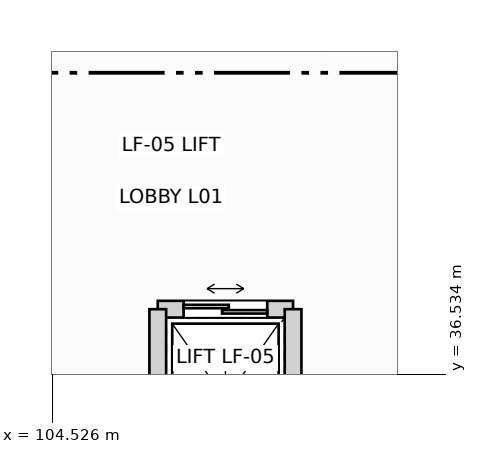
"""IFC4 building model, lengths in metres.
Left out: names, types, materials, properties, quantities, classifications, styles, units other than length and angle.
Written with IfcOpenShell. Run it as: python <this file> out.ifc"""

import sys

from ifc_helpers import new_model, si_unit, direction, frame, frame_2d, origin, place, context, subcontext, project, spatial, rectangle, extrude, element, fill, save


model = new_model("IFC4")
c1 = context("Model", 3, precision=1e-05, world=origin(), true_north=direction((0.0, 1.0)))
c2 = subcontext(c1, "Body", "Model", "MODEL_VIEW")
j1 = project(units=[si_unit("LENGTHUNIT", "METRE"), si_unit("PLANEANGLEUNIT", "RADIAN")], contexts=[c1])
p1 = place(None, origin())
s1 = spatial("IfcSite", under=j1, at=p1, CompositionType="ELEMENT")
p2 = place(p1, origin())
s2 = spatial("IfcBuilding", under=s1, at=p2, CompositionType="ELEMENT")
p3 = place(p2, frame((0.0, 0.0, 6.0)))
s3 = spatial("IfcBuildingStorey", under=s2, at=p3, CompositionType="ELEMENT", Elevation=6.0)
p4 = place(p3, frame((105.91, 37.39, 0.0), z_axis=(0.0, 0.0, 1.0), x_axis=(1.0, 0.0, 0.0)))
e1 = element("IfcWall", 1, at=p4, inside=s3, PredefinedType="PARTITIONING", context=c2, shape_type="SweptSolid", body=[
    extrude(rectangle(XDim=1.78, YDim=0.22, at=frame_2d((0.89, 0.0))), origin(), (0.0, 0.0, 1.0), 5.015),
])
p5 = place(p4, frame((0.34, 0.0, 0.0)))
e2 = element("IfcOpeningElement", 2, at=p5, cuts=e1, PredefinedType="OPENING", context=c2, shape_type="SweptSolid", body=[
    extrude(rectangle(XDim=1.1, YDim=2.18, at=frame_2d((0.55, 1.09))), frame((0.0, 0.12, 0.0), z_axis=(0.0, -1.0, 0.0), x_axis=(1.0, 0.0, 0.0)), (0.0, 0.0, 1.0), 0.24),
])
for number, where, z_axis, x_axis in (
    (3, (105.91, 35.01, 0.0), (0.0, 0.0, 1.0), (0.0, 1.0, 0.0)),
    (4, (107.69, 35.01, 0.0), (0.0, 0.0, 1.0), (0.0, 1.0, 0.0)),
):
    element("IfcWall", number, at=place(p3, frame(where, z_axis=z_axis, x_axis=x_axis)), inside=s3, PredefinedType="PARTITIONING", context=c2, shape_type="SweptSolid", body=[
        extrude(rectangle(XDim=2.38, YDim=0.22, at=frame_2d((1.19, 0.0))), origin(), (0.0, 0.0, 1.0), 5.015),
    ])
p6 = place(p5, origin())
e5 = element("IfcDoor", 5, at=p6, inside=s3, OperationType="DOUBLE_DOOR_SLIDING", PredefinedType="DOOR", context=c2, shape_type="SweptSolid", body=[
    extrude(rectangle(XDim=1.1, YDim=2.18, at=frame_2d((0.55, 1.09))), frame((0.0, 0.025, 0.0), z_axis=(0.0, -1.0, 0.0), x_axis=(1.0, 0.0, 0.0)), (0.0, 0.0, 1.0), 0.05),
])
fill(e2, e5)
save(model, sys.argv[1])
